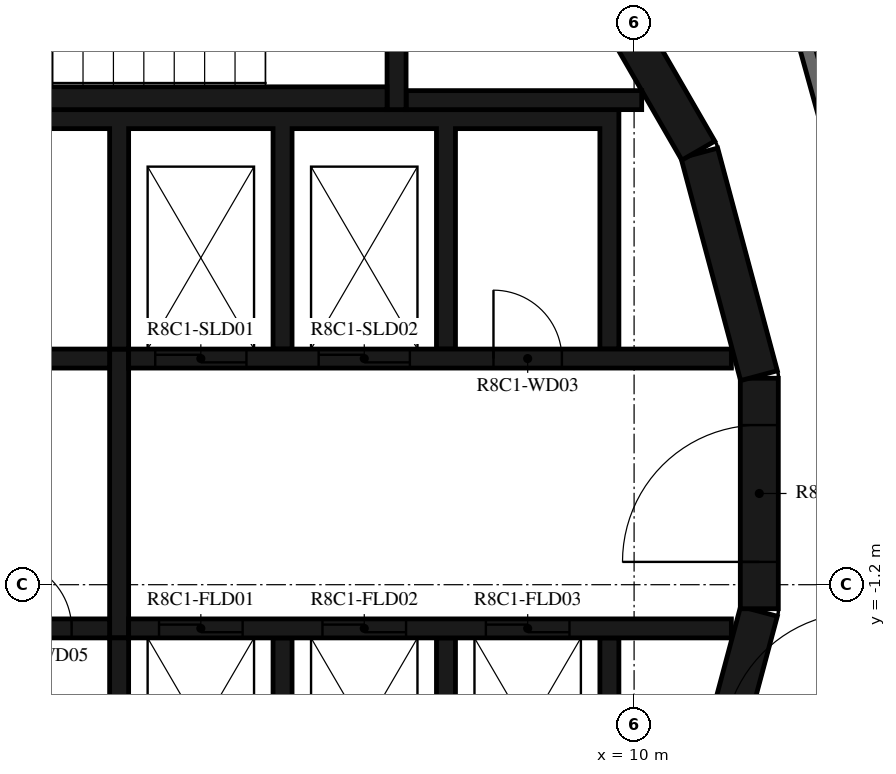
"""IFC4 building model, lengths in metres.
Left out: names, types, materials, properties, quantities, classifications, styles, units other than length and angle.
Written with IfcOpenShell. Run it as: python <this file> out.ifc"""

import sys

from ifc_helpers import new_model, si_unit, direction, frame, frame_2d, origin, place, context, subcontext, project, spatial, polyline, rectangle, outline, extrude, element, fill, save


model = new_model("IFC4")
c1 = context("Model", 3, precision=1e-05, world=origin(), true_north=direction((0.0, 1.0)))
c2 = subcontext(c1, "Body", "Model", "MODEL_VIEW")
j1 = project(units=[si_unit("LENGTHUNIT", "METRE"), si_unit("PLANEANGLEUNIT", "RADIAN")], contexts=[c1])
p1 = place(None, origin())
s1 = spatial("IfcSite", under=j1, at=p1, CompositionType="ELEMENT")
p2 = place(p1, origin())
s2 = spatial("IfcBuilding", under=s1, at=p2, CompositionType="ELEMENT")
p3 = place(p2, frame((0.0, 0.0, 322.7)))
s3 = spatial("IfcBuildingStorey", under=s2, at=p3, CompositionType="ELEMENT", Elevation=322.7)
p4 = place(p3, frame((10.858, -4.479, 0.0), z_axis=(0.0, 0.0, 1.0), x_axis=(0.258734743916, 0.965948410781, 0.0)))
e1 = element("IfcWall", 1, at=p4, inside=s3, PredefinedType="SHEAR", context=c2, shape_type="SweptSolid", body=[
    extrude(rectangle(XDim=3.033, YDim=0.5, at=frame_2d((1.516, 0.0))), origin(), (0.0, 0.0, 1.0), 3.05),
])
p5 = place(p3, frame((11.647, -1.516, 0.0), z_axis=(0.0, 0.0, 1.0), x_axis=(0.0, 1.0, 0.0)))
e2 = element("IfcWall", 2, at=p5, inside=s3, PredefinedType="SHEAR", context=c2, shape_type="SweptSolid", body=[
    extrude(rectangle(XDim=3.033, YDim=0.5, at=frame_2d((1.516, 0.0))), origin(), (0.0, 0.0, 1.0), 3.05),
])
p6 = place(p5, frame((0.616, 0.0, 0.0)))
e3 = element("IfcOpeningElement", 3, at=p6, cuts=e2, PredefinedType="OPENING", context=c2, shape_type="SweptSolid", body=[
    extrude(rectangle(XDim=1.8, YDim=2.1, at=frame_2d((0.9, 1.05))), frame((0.0, 0.26, 0.0), z_axis=(0.0, -1.0, 0.0), x_axis=(1.0, 0.0, 0.0)), (0.0, 0.0, 1.0), 0.52),
])
for number, where, z_axis, x_axis in (
    (4, (11.643, 1.55, 0.0), (0.0, 0.0, 1.0), (-0.259, 0.966, 0.0)),
    (5, (10.845, 4.51, 0.0), (0.0, 0.0, 1.0), (-0.5, 0.866, 0.0)),
):
    element("IfcWall", number, at=place(p3, frame(where, z_axis=z_axis, x_axis=x_axis)), inside=s3, PredefinedType="SHEAR", context=c2, shape_type="SweptSolid", body=[
        extrude(rectangle(XDim=3.033, YDim=0.5, at=frame_2d((1.516, 0.0))), origin(), (0.0, 0.0, 1.0), 3.05),
    ])
p7 = place(p3, frame((0.0, 5.2, 0.0), z_axis=(0.0, 0.0, 1.0), x_axis=(1.0, 0.0, 0.0)))
e6 = element("IfcWall", 6, at=p7, inside=s3, PredefinedType="SHEAR", context=c2, shape_type="SweptSolid", body=[
    extrude(rectangle(XDim=6.75, YDim=0.3, at=frame_2d((3.375, 0.0))), origin(), (0.0, 0.0, 1.0), 3.05),
])
p8 = place(p3, frame((6.875, 5.05, 0.0), z_axis=(0.0, 0.0, 1.0), x_axis=(0.0, 1.0, 0.0)))
e7 = element("IfcWall", 7, at=p8, inside=s3, PredefinedType="SHEAR", context=c2, shape_type="SweptSolid", body=[
    extrude(rectangle(XDim=3.92, YDim=0.25, at=frame_2d((1.96, 0.0))), origin(), (0.0, 0.0, 1.0), 3.05),
])
p9 = place(p8, frame((1.11, 0.0, 0.0)))
e8 = element("IfcOpeningElement", 8, at=p9, cuts=e7, PredefinedType="OPENING", context=c2, shape_type="SweptSolid", body=[
    extrude(rectangle(XDim=1.2, YDim=2.1, at=frame_2d((0.6, 1.05))), frame((0.0, 0.135, 0.0), z_axis=(0.0, -1.0, 0.0), x_axis=(1.0, 0.0, 0.0)), (0.0, 0.0, 1.0), 0.27),
])
p10 = place(p3, frame((7.0, 5.175, 0.0), z_axis=(0.0, 0.0, 1.0), x_axis=(1.0, 0.0, 0.0)))
e9 = element("IfcWall", 9, at=p10, inside=s3, PredefinedType="SHEAR", context=c2, shape_type="SweptSolid", body=[
    extrude(rectangle(XDim=3.1, YDim=0.25, at=frame_2d((1.55, 0.0))), origin(), (0.0, 0.0, 1.0), 3.05),
])
p11 = place(p3, origin())
e10 = element("IfcWall", 10, at=p11, inside=s3, PredefinedType="SHEAR", context=c2, shape_type="SweptSolid", body=[
    extrude(outline(polyline([(-9.8, 1.9), (-9.55, 1.9), (-9.55, 4.8), (-5.5, 4.8), (-5.5, 1.9), (-5.25, 1.9), (-5.25, 4.8), (3.1, 4.8), (3.1, 1.9), (3.35, 1.9), (3.35, 4.8), (5.25, 4.8), (5.25, 1.9), (5.5, 1.9), (5.5, 4.8), (7.4, 4.8), (7.4, 1.9), (7.65, 1.9), (7.65, 4.8), (9.55, 4.8), (9.55, 1.9), (9.8, 1.9), (9.8, 4.8), (9.8, 5.05), (-9.8, 5.05), (-9.8, 4.8), (-9.8, 1.9)])), origin(), (0.0, 0.0, 1.0), 3.05),
])
p12 = place(p3, origin())
e11 = element("IfcWall", 11, at=p12, inside=s3, PredefinedType="SHEAR", context=c2, shape_type="SweptSolid", body=[
    extrude(outline(polyline([(9.8, -5.05), (9.8, -4.8), (9.8, -1.9), (9.55, -1.9), (9.55, -4.8), (7.65, -4.8), (7.65, -1.9), (7.4, -1.9), (7.4, -4.8), (5.5, -4.8), (5.5, -1.9), (5.25, -1.9), (5.25, -4.8), (3.35, -4.8), (3.35, -1.9), (3.1, -1.9), (3.1, -4.8), (1.2, -4.8), (1.2, -1.9), (0.95, -1.9), (0.95, -4.8), (-0.95, -4.8), (-0.95, -1.9), (-1.2, -1.9), (-1.2, -4.8), (-3.1, -4.8), (-3.1, -1.9), (-3.35, -1.9), (-3.35, -4.8), (-5.25, -4.8), (-5.25, -1.9), (-5.5, -1.9), (-5.5, -4.8), (-9.55, -4.8), (-9.55, -1.9), (-9.8, -1.9), (-9.8, -4.8), (-9.8, -5.05), (9.8, -5.05)])), origin(), (0.0, 0.0, 1.0), 3.05),
])
p13 = place(p3, frame((-11.28, 1.775, 0.0), z_axis=(0.0, 0.0, 1.0), x_axis=(1.0, 0.0, 0.0)))
e12 = element("IfcWall", 12, at=p13, inside=s3, PredefinedType="SHEAR", context=c2, shape_type="SweptSolid", body=[
    extrude(rectangle(XDim=14.38, YDim=0.25, at=frame_2d((7.19, 0.0))), origin(), (0.0, 0.0, 1.0), 3.05),
])
p14 = place(p13, frame((3.305, 0.0, 0.0)))
e13 = element("IfcOpeningElement", 13, at=p14, cuts=e12, PredefinedType="OPENING", context=c2, shape_type="SweptSolid", body=[
    extrude(rectangle(XDim=0.9, YDim=2.1, at=frame_2d((0.45, 1.05))), frame((0.0, 0.135, 0.0), z_axis=(0.0, -1.0, 0.0), x_axis=(1.0, 0.0, 0.0)), (0.0, 0.0, 1.0), 0.27),
])
p15 = place(p13, frame((9.755, 0.0, 0.0)))
e14 = element("IfcOpeningElement", 14, at=p15, cuts=e12, PredefinedType="OPENING", context=c2, shape_type="SweptSolid", body=[
    extrude(rectangle(XDim=0.9, YDim=2.1, at=frame_2d((0.45, 1.05))), frame((0.0, 0.135, 0.0), z_axis=(0.0, -1.0, 0.0), x_axis=(1.0, 0.0, 0.0)), (0.0, 0.0, 1.0), 0.27),
])
p16 = place(p3, frame((3.35, 1.775, 0.0), z_axis=(0.0, 0.0, 1.0), x_axis=(1.0, 0.0, 0.0)))
e15 = element("IfcWall", 15, at=p16, inside=s3, PredefinedType="SHEAR", context=c2, shape_type="SweptSolid", body=[
    extrude(rectangle(XDim=7.93, YDim=0.25, at=frame_2d((3.965, 0.0))), origin(), (0.0, 0.0, 1.0), 3.05),
])
p17 = place(p16, frame((0.35, 0.0, 0.0)))
e16 = element("IfcOpeningElement", 16, at=p17, cuts=e15, PredefinedType="OPENING", context=c2, shape_type="SweptSolid", body=[
    extrude(rectangle(XDim=1.2, YDim=2.4, at=frame_2d((0.6, 1.2))), frame((0.0, 0.135, 0.0), z_axis=(0.0, -1.0, 0.0), x_axis=(1.0, 0.0, 0.0)), (0.0, 0.0, 1.0), 0.27),
])
p18 = place(p16, frame((2.5, 0.0, 0.0)))
e17 = element("IfcOpeningElement", 17, at=p18, cuts=e15, PredefinedType="OPENING", context=c2, shape_type="SweptSolid", body=[
    extrude(rectangle(XDim=1.2, YDim=2.4, at=frame_2d((0.6, 1.2))), frame((0.0, 0.135, 0.0), z_axis=(0.0, -1.0, 0.0), x_axis=(1.0, 0.0, 0.0)), (0.0, 0.0, 1.0), 0.27),
])
p19 = place(p16, frame((4.8, 0.0, 0.0)))
e18 = element("IfcOpeningElement", 18, at=p19, cuts=e15, PredefinedType="OPENING", context=c2, shape_type="SweptSolid", body=[
    extrude(rectangle(XDim=0.9, YDim=2.1, at=frame_2d((0.45, 1.05))), frame((0.0, 0.135, 0.0), z_axis=(0.0, -1.0, 0.0), x_axis=(1.0, 0.0, 0.0)), (0.0, 0.0, 1.0), 0.27),
])
p20 = place(p3, frame((-11.28, -1.775, 0.0), z_axis=(0.0, 0.0, 1.0), x_axis=(1.0, 0.0, 0.0)))
e19 = element("IfcWall", 19, at=p20, inside=s3, PredefinedType="SHEAR", context=c2, shape_type="SweptSolid", body=[
    extrude(rectangle(XDim=14.38, YDim=0.25, at=frame_2d((7.19, 0.0))), origin(), (0.0, 0.0, 1.0), 3.05),
])
p21 = place(p20, frame((6.43, 0.0, 0.0)))
e20 = element("IfcOpeningElement", 20, at=p21, cuts=e19, PredefinedType="OPENING", context=c2, shape_type="SweptSolid", body=[
    extrude(rectangle(XDim=1.1, YDim=2.1, at=frame_2d((0.55, 1.05))), frame((0.0, 0.135, 0.0), z_axis=(0.0, -1.0, 0.0), x_axis=(1.0, 0.0, 0.0)), (0.0, 0.0, 1.0), 0.27),
])
p22 = place(p20, frame((8.58, 0.0, 0.0)))
e21 = element("IfcOpeningElement", 21, at=p22, cuts=e19, PredefinedType="OPENING", context=c2, shape_type="SweptSolid", body=[
    extrude(rectangle(XDim=1.1, YDim=2.1, at=frame_2d((0.55, 1.05))), frame((0.0, 0.135, 0.0), z_axis=(0.0, -1.0, 0.0), x_axis=(1.0, 0.0, 0.0)), (0.0, 0.0, 1.0), 0.27),
])
p23 = place(p20, frame((10.73, 0.0, 0.0)))
e22 = element("IfcOpeningElement", 22, at=p23, cuts=e19, PredefinedType="OPENING", context=c2, shape_type="SweptSolid", body=[
    extrude(rectangle(XDim=1.1, YDim=2.1, at=frame_2d((0.55, 1.05))), frame((0.0, 0.135, 0.0), z_axis=(0.0, -1.0, 0.0), x_axis=(1.0, 0.0, 0.0)), (0.0, 0.0, 1.0), 0.27),
])
p24 = place(p20, frame((3.305, 0.0, 0.0)))
e23 = element("IfcOpeningElement", 23, at=p24, cuts=e19, PredefinedType="OPENING", context=c2, shape_type="SweptSolid", body=[
    extrude(rectangle(XDim=0.9, YDim=2.1, at=frame_2d((0.45, 1.05))), frame((0.0, 0.135, 0.0), z_axis=(0.0, -1.0, 0.0), x_axis=(1.0, 0.0, 0.0)), (0.0, 0.0, 1.0), 0.27),
])
p25 = place(p20, frame((12.98, 0.0, 0.0)))
e24 = element("IfcOpeningElement", 24, at=p25, cuts=e19, PredefinedType="OPENING", context=c2, shape_type="SweptSolid", body=[
    extrude(rectangle(XDim=0.9, YDim=2.1, at=frame_2d((0.45, 1.05))), frame((0.0, 0.135, 0.0), z_axis=(0.0, -1.0, 0.0), x_axis=(1.0, 0.0, 0.0)), (0.0, 0.0, 1.0), 0.27),
])
p26 = place(p3, frame((3.35, -1.775, 0.0), z_axis=(0.0, 0.0, 1.0), x_axis=(1.0, 0.0, 0.0)))
e25 = element("IfcWall", 25, at=p26, inside=s3, PredefinedType="SHEAR", context=c2, shape_type="SweptSolid", body=[
    extrude(rectangle(XDim=7.93, YDim=0.25, at=frame_2d((3.965, 0.0))), origin(), (0.0, 0.0, 1.0), 3.05),
])
p27 = place(p26, frame((0.4, 0.0, 0.0)))
e26 = element("IfcOpeningElement", 26, at=p27, cuts=e25, PredefinedType="OPENING", context=c2, shape_type="SweptSolid", body=[
    extrude(rectangle(XDim=1.1, YDim=2.4, at=frame_2d((0.55, 1.2))), frame((0.0, 0.135, 0.0), z_axis=(0.0, -1.0, 0.0), x_axis=(1.0, 0.0, 0.0)), (0.0, 0.0, 1.0), 0.27),
])
p28 = place(p26, frame((2.55, 0.0, 0.0)))
e27 = element("IfcOpeningElement", 27, at=p28, cuts=e25, PredefinedType="OPENING", context=c2, shape_type="SweptSolid", body=[
    extrude(rectangle(XDim=1.1, YDim=2.4, at=frame_2d((0.55, 1.2))), frame((0.0, 0.135, 0.0), z_axis=(0.0, -1.0, 0.0), x_axis=(1.0, 0.0, 0.0)), (0.0, 0.0, 1.0), 0.27),
])
p29 = place(p26, frame((4.7, 0.0, 0.0)))
e28 = element("IfcOpeningElement", 28, at=p29, cuts=e25, PredefinedType="OPENING", context=c2, shape_type="SweptSolid", body=[
    extrude(rectangle(XDim=1.1, YDim=2.4, at=frame_2d((0.55, 1.2))), frame((0.0, 0.135, 0.0), z_axis=(0.0, -1.0, 0.0), x_axis=(1.0, 0.0, 0.0)), (0.0, 0.0, 1.0), 0.27),
])
p30 = place(p3, frame((3.225, -1.9, 0.0), z_axis=(0.0, 0.0, 1.0), x_axis=(0.0, 1.0, 0.0)))
e29 = element("IfcWall", 29, at=p30, inside=s3, PredefinedType="SHEAR", context=c2, shape_type="SweptSolid", body=[
    extrude(rectangle(XDim=3.8, YDim=0.25, at=frame_2d((1.9, 0.0))), origin(), (0.0, 0.0, 1.0), 3.05),
])
p31 = place(p3, frame((12.074, -6.831, 0.0), z_axis=(0.0, 0.0, 1.0), x_axis=(0.250391063186, 0.968144780225, 0.0)))
e30 = element("IfcWall", 30, at=p31, inside=s3, PredefinedType="STANDARD", context=c2, shape_type="SweptSolid", body=[
    extrude(rectangle(XDim=7.181, YDim=0.2, at=frame_2d((3.591, 0.0))), origin(), (0.0, 0.0, 1.0), 3.05),
])
p32 = place(p31, frame((3.581, 0.0, 0.0)))
e31 = element("IfcOpeningElement", 31, at=p32, cuts=e30, PredefinedType="OPENING", context=c2, shape_type="SweptSolid", body=[
    extrude(rectangle(XDim=1.8, YDim=2.1, at=frame_2d((0.9, 1.05))), frame((0.0, 0.11, 0.0), z_axis=(0.0, -1.0, 0.0), x_axis=(1.0, 0.0, 0.0)), (0.0, 0.0, 1.0), 0.22),
])
p33 = place(p3, frame((12.913, 3.581, 0.0), z_axis=(0.0, 0.0, 1.0), x_axis=(-0.267223005422, 0.963634715737, 0.0)))
e32 = element("IfcWall", 32, at=p33, inside=s3, PredefinedType="STANDARD", context=c2, shape_type="SweptSolid", body=[
    extrude(rectangle(XDim=3.591, YDim=0.2, at=frame_2d((1.795, 0.0))), origin(), (0.0, 0.0, 1.0), 3.05),
])
p34 = place(p6, origin())
e33 = element("IfcDoor", 33, at=p34, inside=s3, OperationType="DOUBLE_DOOR_SINGLE_SWING", PredefinedType="DOOR", context=c2, shape_type="SweptSolid", body=[
    extrude(rectangle(XDim=1.8, YDim=2.1, at=frame_2d((0.9, 1.05))), frame((0.0, 0.025, 0.0), z_axis=(0.0, -1.0, 0.0), x_axis=(1.0, 0.0, 0.0)), (0.0, 0.0, 1.0), 0.05),
])
fill(e3, e33)
p35 = place(p17, origin())
e34 = element("IfcDoor", 34, at=p35, inside=s3, OperationType="DOUBLE_DOOR_SLIDING", PredefinedType="DOOR", context=c2, shape_type="SweptSolid", body=[
    extrude(rectangle(XDim=1.2, YDim=2.4, at=frame_2d((0.6, 1.2))), frame((0.0, 0.025, 0.0), z_axis=(0.0, -1.0, 0.0), x_axis=(1.0, 0.0, 0.0)), (0.0, 0.0, 1.0), 0.05),
])
fill(e16, e34)
p36 = place(p18, origin())
e35 = element("IfcDoor", 35, at=p36, inside=s3, OperationType="DOUBLE_DOOR_SLIDING", PredefinedType="DOOR", context=c2, shape_type="SweptSolid", body=[
    extrude(rectangle(XDim=1.2, YDim=2.4, at=frame_2d((0.6, 1.2))), frame((0.0, 0.025, 0.0), z_axis=(0.0, -1.0, 0.0), x_axis=(1.0, 0.0, 0.0)), (0.0, 0.0, 1.0), 0.05),
])
fill(e17, e35)
p37 = place(p27, origin())
e36 = element("IfcDoor", 36, at=p37, inside=s3, OperationType="DOUBLE_DOOR_SLIDING", PredefinedType="DOOR", context=c2, shape_type="SweptSolid", body=[
    extrude(rectangle(XDim=1.1, YDim=2.4, at=frame_2d((0.55, 1.2))), frame((0.0, 0.025, 0.0), z_axis=(0.0, -1.0, 0.0), x_axis=(1.0, 0.0, 0.0)), (0.0, 0.0, 1.0), 0.05),
])
fill(e26, e36)
p38 = place(p28, origin())
e37 = element("IfcDoor", 37, at=p38, inside=s3, OperationType="DOUBLE_DOOR_SLIDING", PredefinedType="DOOR", context=c2, shape_type="SweptSolid", body=[
    extrude(rectangle(XDim=1.1, YDim=2.4, at=frame_2d((0.55, 1.2))), frame((0.0, 0.025, 0.0), z_axis=(0.0, -1.0, 0.0), x_axis=(1.0, 0.0, 0.0)), (0.0, 0.0, 1.0), 0.05),
])
fill(e27, e37)
p39 = place(p29, origin())
e38 = element("IfcDoor", 38, at=p39, inside=s3, OperationType="DOUBLE_DOOR_SLIDING", PredefinedType="DOOR", context=c2, shape_type="SweptSolid", body=[
    extrude(rectangle(XDim=1.1, YDim=2.4, at=frame_2d((0.55, 1.2))), frame((0.0, 0.025, 0.0), z_axis=(0.0, -1.0, 0.0), x_axis=(1.0, 0.0, 0.0)), (0.0, 0.0, 1.0), 0.05),
])
fill(e28, e38)
p40 = place(p19, origin())
e39 = element("IfcDoor", 39, at=p40, inside=s3, OperationType="SINGLE_SWING_LEFT", PredefinedType="DOOR", context=c2, shape_type="SweptSolid", body=[
    extrude(rectangle(XDim=0.9, YDim=2.1, at=frame_2d((0.45, 1.05))), frame((0.0, 0.025, 0.0), z_axis=(0.0, -1.0, 0.0), x_axis=(1.0, 0.0, 0.0)), (0.0, 0.0, 1.0), 0.05),
])
fill(e18, e39)
p41 = place(p25, origin())
e40 = element("IfcDoor", 40, at=p41, inside=s3, OperationType="SINGLE_SWING_LEFT", PredefinedType="DOOR", context=c2, shape_type="SweptSolid", body=[
    extrude(rectangle(XDim=0.9, YDim=2.1, at=frame_2d((0.45, 1.05))), frame((0.0, 0.025, 0.0), z_axis=(0.0, -1.0, 0.0), x_axis=(1.0, 0.0, 0.0)), (0.0, 0.0, 1.0), 0.05),
])
fill(e24, e40)
save(model, sys.argv[1])
